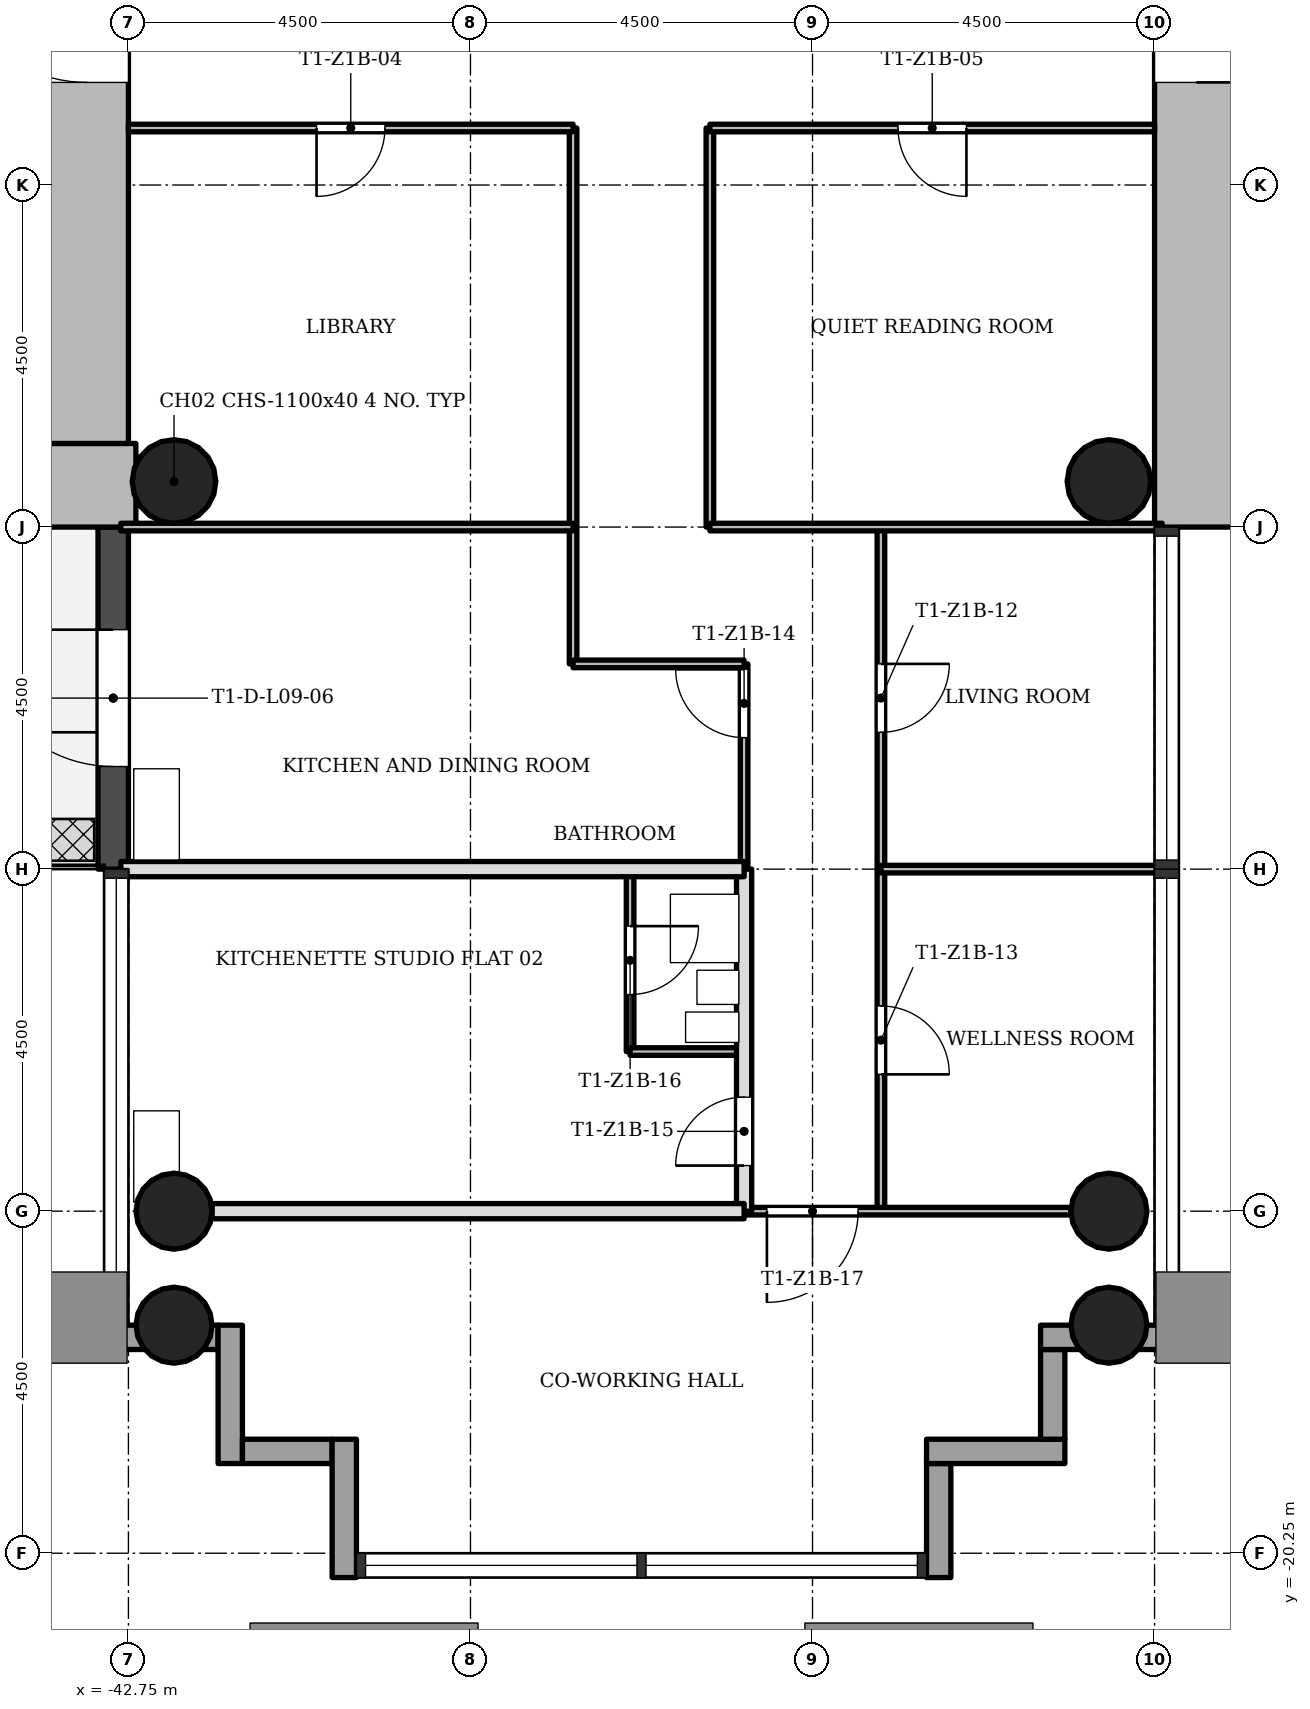
"""IFC4 building model, lengths in metres.
Left out: names, types, materials, properties, quantities, classifications, styles, units other than length and angle.
Written with IfcOpenShell. Run it as: python <this file> out.ifc"""

import sys

from ifc_helpers import new_model, si_unit, direction, frame, frame_2d, origin, origin_2d, place, context, subcontext, project, spatial, rectangle, hollow_circle, extrude, element, fill, save


model = new_model("IFC4")
c1 = context("Model", 3, precision=1e-05, world=origin(), true_north=direction((0.0, 1.0)))
c2 = subcontext(c1, "Body", "Model", "MODEL_VIEW")
j1 = project(units=[si_unit("LENGTHUNIT", "METRE"), si_unit("PLANEANGLEUNIT", "RADIAN")], contexts=[c1])
p1 = place(None, origin())
s1 = spatial("IfcSite", under=j1, at=p1, CompositionType="ELEMENT")
p2 = place(p1, origin())
s2 = spatial("IfcBuilding", under=s1, at=p2, CompositionType="ELEMENT")
p3 = place(p2, frame((0.0, 0.0, 38.1)))
s3 = spatial("IfcBuildingStorey", under=s2, at=p3, CompositionType="ELEMENT", Elevation=38.1)
p4 = place(p3, frame((-28.7, 5.65, 0.0), z_axis=(0.0, 0.0, 1.0), x_axis=(0.0, -1.0, 0.0)))
e1 = element("IfcWall", 1, at=p4, inside=s3, PredefinedType="SHEAR", context=c2, shape_type="SweptSolid", body=[
    extrude(rectangle(XDim=12.4, YDim=1.1, at=frame_2d((6.2, 0.0))), origin(), (0.0, 0.0, 1.0), 3.4),
])
p5 = place(p4, frame((4.75, 0.0, 0.0)))
e2 = element("IfcOpeningElement", 2, at=p5, cuts=e1, PredefinedType="OPENING", context=c2, shape_type="SweptSolid", body=[
    extrude(rectangle(XDim=1.8, YDim=2.1, at=frame_2d((0.9, 1.05))), frame((0.0, 0.56, 0.0), z_axis=(0.0, -1.0, 0.0), x_axis=(1.0, 0.0, 0.0)), (0.0, 0.0, 1.0), 1.12),
])
p6 = place(p3, frame((-50.65, -6.2, 0.0), z_axis=(0.0, 0.0, 1.0), x_axis=(1.0, 0.0, 0.0)))
e3 = element("IfcWall", 3, at=p6, inside=s3, PredefinedType="SHEAR", context=c2, shape_type="SweptSolid", body=[
    extrude(rectangle(XDim=7.998, YDim=1.1, at=frame_2d((3.999, 0.0))), origin(), (0.0, 0.0, 1.0), 3.4),
])
p7 = place(p3, frame((-43.3, -5.65, 0.0), z_axis=(0.0, 0.0, 1.0), x_axis=(0.0, 1.0, 0.0)))
e4 = element("IfcWall", 4, at=p7, inside=s3, PredefinedType="SHEAR", context=c2, shape_type="SweptSolid", body=[
    extrude(rectangle(XDim=12.4, YDim=1.1, at=frame_2d((6.2, 0.0))), origin(), (0.0, 0.0, 1.0), 3.4),
])
p8 = place(p7, frame((4.75, 0.0, 0.0)))
e5 = element("IfcOpeningElement", 5, at=p8, cuts=e4, PredefinedType="OPENING", context=c2, shape_type="SweptSolid", body=[
    extrude(rectangle(XDim=1.8, YDim=2.1, at=frame_2d((0.9, 1.05))), frame((0.0, 0.56, 0.0), z_axis=(0.0, -1.0, 0.0), x_axis=(1.0, 0.0, 0.0)), (0.0, 0.0, 1.0), 1.12),
])
for number, where, z_axis, x_axis in (
    (6, (-42.15, -15.75, 0.0), (0.0, 0.0, 1.0), (1.0, 0.0, 0.0)),
    (7, (-29.85, -15.75, 0.0), (0.0, 0.0, 1.0), (1.0, 0.0, 0.0)),
    (8, (-42.15, -17.25, 0.0), (0.0, 0.0, 1.0), (1.0, 0.0, 0.0)),
    (9, (-29.85, -17.25, 0.0), (0.0, 0.0, 1.0), (1.0, 0.0, 0.0)),
):
    element("IfcColumn", number, at=place(p3, frame(where, z_axis=z_axis, x_axis=x_axis)), inside=s3, PredefinedType="COLUMN", context=c2, shape_type="SweptSolid", body=[
        extrude(hollow_circle(Radius=0.5, WallThickness=0.036, at=origin_2d()), origin(), (0.0, 0.0, 1.0), 3.4),
    ])
for number, where, z_axis, x_axis in (
    (10, (-42.15, -6.15, 0.0), (0.0, 0.0, 1.0), (1.0, 0.0, 0.0)),
    (11, (-29.85, -6.15, 0.0), (0.0, 0.0, 1.0), (1.0, 0.0, 0.0)),
):
    element("IfcColumn", number, at=place(p3, frame(where, z_axis=z_axis, x_axis=x_axis)), inside=s3, PredefinedType="COLUMN", context=c2, shape_type="SweptSolid", body=[
        extrude(hollow_circle(Radius=0.55, WallThickness=0.04, at=origin_2d()), origin(), (0.0, 0.0, 1.0), 3.4),
    ])
p9 = place(p3, frame((-42.95, -6.75, -0.02), z_axis=(0.0, 0.0, 1.0), x_axis=(0.0, -1.0, 0.0)))
e12 = element("IfcWall", 12, at=p9, inside=s3, PredefinedType="STANDARD", context=c2, shape_type="SweptSolid", body=[
    extrude(rectangle(XDim=4.5, YDim=0.4, at=frame_2d((2.25, 0.0))), origin(), (0.0, 0.0, 1.0), 3.12),
])
p10 = place(p9, frame((1.35, 0.0, 0.02)))
e13 = element("IfcOpeningElement", 13, at=p10, cuts=e12, PredefinedType="OPENING", context=c2, shape_type="SweptSolid", body=[
    extrude(rectangle(XDim=1.8, YDim=2.1, at=frame_2d((0.9, 1.05))), frame((0.0, 0.21, 0.0), z_axis=(0.0, -1.0, 0.0), x_axis=(1.0, 0.0, 0.0)), (0.0, 0.0, 1.0), 0.42),
])
p11 = place(p3, frame((-43.07, -17.41, -0.3), z_axis=(0.0, 0.0, 1.0), x_axis=(1.0, 0.0, 0.0)))
e14 = element("IfcWall", 14, at=p11, inside=s3, PredefinedType="STANDARD", context=c2, shape_type="SweptSolid", body=[
    extrude(rectangle(XDim=1.5, YDim=0.32, at=frame_2d((0.75, 0.0))), origin(), (0.0, 0.0, 1.0), 3.4),
])
p12 = place(p3, frame((-41.41, -17.25, -0.3), z_axis=(0.0, 0.0, 1.0), x_axis=(0.0, -1.0, 0.0)))
e15 = element("IfcWall", 15, at=p12, inside=s3, PredefinedType="STANDARD", context=c2, shape_type="SweptSolid", body=[
    extrude(rectangle(XDim=1.82, YDim=0.32, at=frame_2d((0.91, 0.0))), origin(), (0.0, 0.0, 1.0), 3.4),
])
p13 = place(p3, frame((-41.25, -18.91, -0.3), z_axis=(0.0, 0.0, 1.0), x_axis=(1.0, 0.0, 0.0)))
e16 = element("IfcWall", 16, at=p13, inside=s3, PredefinedType="STANDARD", context=c2, shape_type="SweptSolid", body=[
    extrude(rectangle(XDim=1.18, YDim=0.32, at=frame_2d((0.59, 0.0))), origin(), (0.0, 0.0, 1.0), 3.4),
])
p14 = place(p3, frame((-39.91, -18.75, -0.3), z_axis=(0.0, 0.0, 1.0), x_axis=(0.0, -1.0, 0.0)))
e17 = element("IfcWall", 17, at=p14, inside=s3, PredefinedType="STANDARD", context=c2, shape_type="SweptSolid", body=[
    extrude(rectangle(XDim=1.82, YDim=0.32, at=frame_2d((0.91, 0.0))), origin(), (0.0, 0.0, 1.0), 3.4),
])
p15 = place(p3, frame((-32.09, -20.57, -0.3), z_axis=(0.0, 0.0, 1.0), x_axis=(0.0, 1.0, 0.0)))
e18 = element("IfcWall", 18, at=p15, inside=s3, PredefinedType="STANDARD", context=c2, shape_type="SweptSolid", body=[
    extrude(rectangle(XDim=1.5, YDim=0.32, at=frame_2d((0.75, 0.0))), origin(), (0.0, 0.0, 1.0), 3.4),
])
p16 = place(p3, frame((-32.25, -18.91, -0.3), z_axis=(0.0, 0.0, 1.0), x_axis=(1.0, 0.0, 0.0)))
e19 = element("IfcWall", 19, at=p16, inside=s3, PredefinedType="STANDARD", context=c2, shape_type="SweptSolid", body=[
    extrude(rectangle(XDim=1.82, YDim=0.32, at=frame_2d((0.91, 0.0))), origin(), (0.0, 0.0, 1.0), 3.4),
])
p17 = place(p3, frame((-30.59, -18.75, -0.3), z_axis=(0.0, 0.0, 1.0), x_axis=(0.0, 1.0, 0.0)))
e20 = element("IfcWall", 20, at=p17, inside=s3, PredefinedType="STANDARD", context=c2, shape_type="SweptSolid", body=[
    extrude(rectangle(XDim=1.18, YDim=0.32, at=frame_2d((0.59, 0.0))), origin(), (0.0, 0.0, 1.0), 3.4),
])
p18 = place(p3, frame((-30.75, -17.41, -0.3), z_axis=(0.0, 0.0, 1.0), x_axis=(1.0, 0.0, 0.0)))
e21 = element("IfcWall", 21, at=p18, inside=s3, PredefinedType="STANDARD", context=c2, shape_type="SweptSolid", body=[
    extrude(rectangle(XDim=1.82, YDim=0.32, at=frame_2d((0.91, 0.0))), origin(), (0.0, 0.0, 1.0), 3.4),
])
p19 = place(p3, frame((-36.9, -8.55, 0.0), z_axis=(0.0, 0.0, 1.0), x_axis=(0.0, 1.0, 0.0)))
e22 = element("IfcWall", 22, at=p19, inside=s3, PredefinedType="PARTITIONING", context=c2, shape_type="SweptSolid", body=[
    extrude(rectangle(XDim=7.05, YDim=0.1, at=frame_2d((3.525, 0.0))), origin(), (0.0, 0.0, 1.0), 3.0),
])
p20 = place(p3, frame((-36.15, -13.65, 0.0), z_axis=(0.0, 0.0, 1.0), x_axis=(0.0, 1.0, 0.0)))
e23 = element("IfcWall", 23, at=p20, inside=s3, PredefinedType="PARTITIONING", context=c2, shape_type="SweptSolid", body=[
    extrude(rectangle(XDim=2.4, YDim=0.1, at=frame_2d((1.2, 0.0))), origin(), (0.0, 0.0, 1.0), 3.0),
])
p21 = place(p20, frame((0.75, 0.0, 0.0)))
e24 = element("IfcOpeningElement", 24, at=p21, cuts=e23, PredefinedType="OPENING", context=c2, shape_type="SweptSolid", body=[
    extrude(rectangle(XDim=0.9, YDim=2.1, at=frame_2d((0.45, 1.05))), frame((0.0, 0.06, 0.0), z_axis=(0.0, -1.0, 0.0), x_axis=(1.0, 0.0, 0.0)), (0.0, 0.0, 1.0), 0.12),
])
p22 = place(p3, frame((-35.1, -6.75, 0.0), z_axis=(0.0, 0.0, 1.0), x_axis=(0.0, 1.0, 0.0)))
e25 = element("IfcWall", 25, at=p22, inside=s3, PredefinedType="PARTITIONING", context=c2, shape_type="SweptSolid", body=[
    extrude(rectangle(XDim=5.25, YDim=0.1, at=frame_2d((2.625, 0.0))), origin(), (0.0, 0.0, 1.0), 3.0),
])
p23 = place(p3, frame((-34.65, -11.25, 0.0), z_axis=(0.0, 0.0, 1.0), x_axis=(0.0, 1.0, 0.0)))
e26 = element("IfcWall", 26, at=p23, inside=s3, PredefinedType="PARTITIONING", context=c2, shape_type="SweptSolid", body=[
    extrude(rectangle(XDim=2.7, YDim=0.1, at=frame_2d((1.35, 0.0))), origin(), (0.0, 0.0, 1.0), 3.0),
])
p24 = place(p23, frame((1.73, 0.0, 0.0)))
e27 = element("IfcOpeningElement", 27, at=p24, cuts=e26, PredefinedType="OPENING", context=c2, shape_type="SweptSolid", body=[
    extrude(rectangle(XDim=0.9, YDim=2.1, at=frame_2d((0.45, 1.05))), frame((0.0, 0.06, 0.0), z_axis=(0.0, -1.0, 0.0), x_axis=(1.0, 0.0, 0.0)), (0.0, 0.0, 1.0), 0.12),
])
p25 = place(p3, frame((-34.65, -15.75, 0.0), z_axis=(0.0, 0.0, 1.0), x_axis=(0.0, 1.0, 0.0)))
e28 = element("IfcWall", 28, at=p25, inside=s3, PredefinedType="SOLIDWALL", context=c2, shape_type="SweptSolid", body=[
    extrude(rectangle(XDim=4.5, YDim=0.2, at=frame_2d((2.25, 0.0))), origin(), (0.0, 0.0, 1.0), 3.0),
])
p26 = place(p25, frame((0.6, 0.0, 0.0)))
e29 = element("IfcOpeningElement", 29, at=p26, cuts=e28, PredefinedType="OPENING", context=c2, shape_type="SweptSolid", body=[
    extrude(rectangle(XDim=0.9, YDim=2.1, at=frame_2d((0.45, 1.05))), frame((0.0, 0.11, 0.0), z_axis=(0.0, -1.0, 0.0), x_axis=(1.0, 0.0, 0.0)), (0.0, 0.0, 1.0), 0.22),
])
p27 = place(p3, frame((-32.85, -15.75, 0.0), z_axis=(0.0, 0.0, 1.0), x_axis=(0.0, 1.0, 0.0)))
e30 = element("IfcWall", 30, at=p27, inside=s3, PredefinedType="PARTITIONING", context=c2, shape_type="SweptSolid", body=[
    extrude(rectangle(XDim=9.0, YDim=0.1, at=frame_2d((4.5, 0.0))), origin(), (0.0, 0.0, 1.0), 3.0),
])
p28 = place(p27, frame((6.3, 0.0, 0.0)))
e31 = element("IfcOpeningElement", 31, at=p28, cuts=e30, PredefinedType="OPENING", context=c2, shape_type="SweptSolid", body=[
    extrude(rectangle(XDim=0.9, YDim=2.1, at=frame_2d((0.45, 1.05))), frame((0.0, 0.06, 0.0), z_axis=(0.0, -1.0, 0.0), x_axis=(1.0, 0.0, 0.0)), (0.0, 0.0, 1.0), 0.12),
])
p29 = place(p27, frame((1.8, 0.0, 0.0)))
e32 = element("IfcOpeningElement", 32, at=p29, cuts=e30, PredefinedType="OPENING", context=c2, shape_type="SweptSolid", body=[
    extrude(rectangle(XDim=0.9, YDim=2.1, at=frame_2d((0.45, 1.05))), frame((0.0, 0.06, 0.0), z_axis=(0.0, -1.0, 0.0), x_axis=(1.0, 0.0, 0.0)), (0.0, 0.0, 1.0), 0.12),
])
p30 = place(p3, frame((-34.65, -15.75, 0.0), z_axis=(0.0, 0.0, 1.0), x_axis=(1.0, 0.0, 0.0)))
e33 = element("IfcWall", 33, at=p30, inside=s3, PredefinedType="PARTITIONING", context=c2, shape_type="SweptSolid", body=[
    extrude(rectangle(XDim=4.3, YDim=0.1, at=frame_2d((2.15, 0.0))), origin(), (0.0, 0.0, 1.0), 3.0),
])
p31 = place(p30, frame((0.3, 0.0, 0.0)))
e34 = element("IfcOpeningElement", 34, at=p31, cuts=e33, PredefinedType="OPENING", context=c2, shape_type="SweptSolid", body=[
    extrude(rectangle(XDim=1.2, YDim=2.1, at=frame_2d((0.6, 1.05))), frame((0.0, 0.06, 0.0), z_axis=(0.0, -1.0, 0.0), x_axis=(1.0, 0.0, 0.0)), (0.0, 0.0, 1.0), 0.12),
])
p32 = place(p3, frame((-41.65, -15.75, 0.0), z_axis=(0.0, 0.0, 1.0), x_axis=(1.0, 0.0, 0.0)))
e35 = element("IfcWall", 35, at=p32, inside=s3, PredefinedType="SOLIDWALL", context=c2, shape_type="SweptSolid", body=[
    extrude(rectangle(XDim=7.0, YDim=0.2, at=frame_2d((3.5, 0.0))), origin(), (0.0, 0.0, 1.0), 3.0),
])
p33 = place(p3, frame((-36.15, -13.65, 0.0), z_axis=(0.0, 0.0, 1.0), x_axis=(1.0, 0.0, 0.0)))
e36 = element("IfcWall", 36, at=p33, inside=s3, PredefinedType="PARTITIONING", context=c2, shape_type="SweptSolid", body=[
    extrude(rectangle(XDim=1.5, YDim=0.1, at=frame_2d((0.75, 0.0))), origin(), (0.0, 0.0, 1.0), 3.0),
])
p34 = place(p3, frame((-32.85, -11.25, 0.0), z_axis=(0.0, 0.0, 1.0), x_axis=(1.0, 0.0, 0.0)))
e37 = element("IfcWall", 37, at=p34, inside=s3, PredefinedType="PARTITIONING", context=c2, shape_type="SweptSolid", body=[
    extrude(rectangle(XDim=3.7, YDim=0.1, at=frame_2d((1.85, 0.0))), origin(), (0.0, 0.0, 1.0), 3.0),
])
p35 = place(p3, frame((-42.85, -11.25, 0.0), z_axis=(0.0, 0.0, 1.0), x_axis=(1.0, 0.0, 0.0)))
e38 = element("IfcWall", 38, at=p35, inside=s3, PredefinedType="SOLIDWALL", context=c2, shape_type="SweptSolid", body=[
    extrude(rectangle(XDim=8.2, YDim=0.2, at=frame_2d((4.1, 0.0))), origin(), (0.0, 0.0, 1.0), 3.0),
])
p36 = place(p3, frame((-36.9, -8.55, 0.0), z_axis=(0.0, 0.0, 1.0), x_axis=(1.0, 0.0, 0.0)))
e39 = element("IfcWall", 39, at=p36, inside=s3, PredefinedType="PARTITIONING", context=c2, shape_type="SweptSolid", body=[
    extrude(rectangle(XDim=2.25, YDim=0.1, at=frame_2d((1.125, 0.0))), origin(), (0.0, 0.0, 1.0), 3.0),
])
for number, where, z_axis, x_axis in (
    (40, (-42.85, -6.75, 0.0), (0.0, 0.0, 1.0), (1.0, 0.0, 0.0)),
    (41, (-35.1, -6.75, 0.0), (0.0, 0.0, 1.0), (1.0, 0.0, 0.0)),
):
    element("IfcWall", number, at=place(p3, frame(where, z_axis=z_axis, x_axis=x_axis)), inside=s3, PredefinedType="PARTITIONING", context=c2, shape_type="SweptSolid", body=[
        extrude(rectangle(XDim=5.95, YDim=0.1, at=frame_2d((2.975, 0.0))), origin(), (0.0, 0.0, 1.0), 3.0),
    ])
p37 = place(p3, frame((-42.75, -1.5, 0.0), z_axis=(0.0, 0.0, 1.0), x_axis=(1.0, 0.0, 0.0)))
e42 = element("IfcWall", 42, at=p37, inside=s3, PredefinedType="PARTITIONING", context=c2, shape_type="SweptSolid", body=[
    extrude(rectangle(XDim=5.85, YDim=0.1, at=frame_2d((2.925, 0.0))), origin(), (0.0, 0.0, 1.0), 3.0),
])
p38 = place(p37, frame((2.475, 0.0, 0.0)))
e43 = element("IfcOpeningElement", 43, at=p38, cuts=e42, PredefinedType="OPENING", context=c2, shape_type="SweptSolid", body=[
    extrude(rectangle(XDim=0.9, YDim=2.1, at=frame_2d((0.45, 1.05))), frame((0.0, 0.06, 0.0), z_axis=(0.0, -1.0, 0.0), x_axis=(1.0, 0.0, 0.0)), (0.0, 0.0, 1.0), 0.12),
])
p39 = place(p3, frame((-35.1, -1.5, 0.0), z_axis=(0.0, 0.0, 1.0), x_axis=(1.0, 0.0, 0.0)))
e44 = element("IfcWall", 44, at=p39, inside=s3, PredefinedType="PARTITIONING", context=c2, shape_type="SweptSolid", body=[
    extrude(rectangle(XDim=5.85, YDim=0.1, at=frame_2d((2.925, 0.0))), origin(), (0.0, 0.0, 1.0), 3.0),
])
p40 = place(p39, frame((2.475, 0.0, 0.0)))
e45 = element("IfcOpeningElement", 45, at=p40, cuts=e44, PredefinedType="OPENING", context=c2, shape_type="SweptSolid", body=[
    extrude(rectangle(XDim=0.9, YDim=2.1, at=frame_2d((0.45, 1.05))), frame((0.0, 0.06, 0.0), z_axis=(0.0, -1.0, 0.0), x_axis=(1.0, 0.0, 0.0)), (0.0, 0.0, 1.0), 0.12),
])
p41 = place(p10, origin())
e46 = element("IfcDoor", 46, at=p41, inside=s3, OperationType="SINGLE_SWING_LEFT", PredefinedType="DOOR", context=c2, shape_type="SweptSolid", body=[
    extrude(rectangle(XDim=1.8, YDim=2.1, at=frame_2d((0.9, 1.05))), frame((0.0, 0.025, 0.0), z_axis=(0.0, -1.0, 0.0), x_axis=(1.0, 0.0, 0.0)), (0.0, 0.0, 1.0), 0.05),
])
fill(e13, e46)
p42 = place(p38, origin())
e47 = element("IfcDoor", 47, at=p42, inside=s3, OperationType="SINGLE_SWING_LEFT", PredefinedType="DOOR", context=c2, shape_type="SweptSolid", body=[
    extrude(rectangle(XDim=0.9, YDim=2.1, at=frame_2d((0.45, 1.05))), frame((0.0, 0.025, 0.0), z_axis=(0.0, -1.0, 0.0), x_axis=(1.0, 0.0, 0.0)), (0.0, 0.0, 1.0), 0.05),
])
fill(e43, e47)
p43 = place(p40, origin())
e48 = element("IfcDoor", 48, at=p43, inside=s3, OperationType="SINGLE_SWING_RIGHT", PredefinedType="DOOR", context=c2, shape_type="SweptSolid", body=[
    extrude(rectangle(XDim=0.9, YDim=2.1, at=frame_2d((0.45, 1.05))), frame((0.0, 0.025, 0.0), z_axis=(0.0, -1.0, 0.0), x_axis=(1.0, 0.0, 0.0)), (0.0, 0.0, 1.0), 0.05),
])
fill(e45, e48)
p44 = place(p28, origin())
e49 = element("IfcDoor", 49, at=p44, inside=s3, OperationType="SINGLE_SWING_RIGHT", PredefinedType="DOOR", context=c2, shape_type="SweptSolid", body=[
    extrude(rectangle(XDim=0.9, YDim=2.1, at=frame_2d((0.45, 1.05))), frame((0.0, 0.025, 0.0), z_axis=(0.0, -1.0, 0.0), x_axis=(1.0, 0.0, 0.0)), (0.0, 0.0, 1.0), 0.05),
])
fill(e31, e49)
p45 = place(p29, origin())
e50 = element("IfcDoor", 50, at=p45, inside=s3, OperationType="SINGLE_SWING_LEFT", PredefinedType="DOOR", context=c2, shape_type="SweptSolid", body=[
    extrude(rectangle(XDim=0.9, YDim=2.1, at=frame_2d((0.45, 1.05))), frame((0.0, 0.025, 0.0), z_axis=(0.0, -1.0, 0.0), x_axis=(1.0, 0.0, 0.0)), (0.0, 0.0, 1.0), 0.05),
])
fill(e32, e50)
p46 = place(p24, origin())
e51 = element("IfcDoor", 51, at=p46, inside=s3, OperationType="SINGLE_SWING_LEFT", PredefinedType="DOOR", context=c2, shape_type="SweptSolid", body=[
    extrude(rectangle(XDim=0.9, YDim=2.1, at=frame_2d((0.45, 1.05))), frame((0.0, 0.025, 0.0), z_axis=(0.0, -1.0, 0.0), x_axis=(1.0, 0.0, 0.0)), (0.0, 0.0, 1.0), 0.05),
])
fill(e27, e51)
p47 = place(p26, origin())
e52 = element("IfcDoor", 52, at=p47, inside=s3, OperationType="SINGLE_SWING_RIGHT", PredefinedType="DOOR", context=c2, shape_type="SweptSolid", body=[
    extrude(rectangle(XDim=0.9, YDim=2.1, at=frame_2d((0.45, 1.05))), frame((0.0, 0.025, 0.0), z_axis=(0.0, -1.0, 0.0), x_axis=(1.0, 0.0, 0.0)), (0.0, 0.0, 1.0), 0.05),
])
fill(e29, e52)
p48 = place(p21, origin())
e53 = element("IfcDoor", 53, at=p48, inside=s3, OperationType="SINGLE_SWING_RIGHT", PredefinedType="DOOR", context=c2, shape_type="SweptSolid", body=[
    extrude(rectangle(XDim=0.9, YDim=2.1, at=frame_2d((0.45, 1.05))), frame((0.0, 0.025, 0.0), z_axis=(0.0, -1.0, 0.0), x_axis=(1.0, 0.0, 0.0)), (0.0, 0.0, 1.0), 0.05),
])
fill(e24, e53)
p49 = place(p31, origin())
e54 = element("IfcDoor", 54, at=p49, inside=s3, OperationType="SINGLE_SWING_LEFT", PredefinedType="DOOR", context=c2, shape_type="SweptSolid", body=[
    extrude(rectangle(XDim=1.2, YDim=2.1, at=frame_2d((0.6, 1.05))), frame((0.0, 0.025, 0.0), z_axis=(0.0, -1.0, 0.0), x_axis=(1.0, 0.0, 0.0)), (0.0, 0.0, 1.0), 0.05),
])
fill(e34, e54)
p50 = place(p5, origin())
e55 = element("IfcDoor", 55, at=p50, inside=s3, OperationType="SINGLE_SWING_LEFT", PredefinedType="DOOR", context=c2, shape_type="SweptSolid", body=[
    extrude(rectangle(XDim=1.8, YDim=2.1, at=frame_2d((0.9, 1.05))), frame((0.0, 0.025, 0.0), z_axis=(0.0, -1.0, 0.0), x_axis=(1.0, 0.0, 0.0)), (0.0, 0.0, 1.0), 0.05),
])
fill(e2, e55)
p51 = place(p8, origin())
e56 = element("IfcDoor", 56, at=p51, inside=s3, OperationType="SINGLE_SWING_LEFT", PredefinedType="DOOR", context=c2, shape_type="SweptSolid", body=[
    extrude(rectangle(XDim=1.8, YDim=2.1, at=frame_2d((0.9, 1.05))), frame((0.0, 0.025, 0.0), z_axis=(0.0, -1.0, 0.0), x_axis=(1.0, 0.0, 0.0)), (0.0, 0.0, 1.0), 0.05),
])
fill(e5, e56)
save(model, sys.argv[1])
